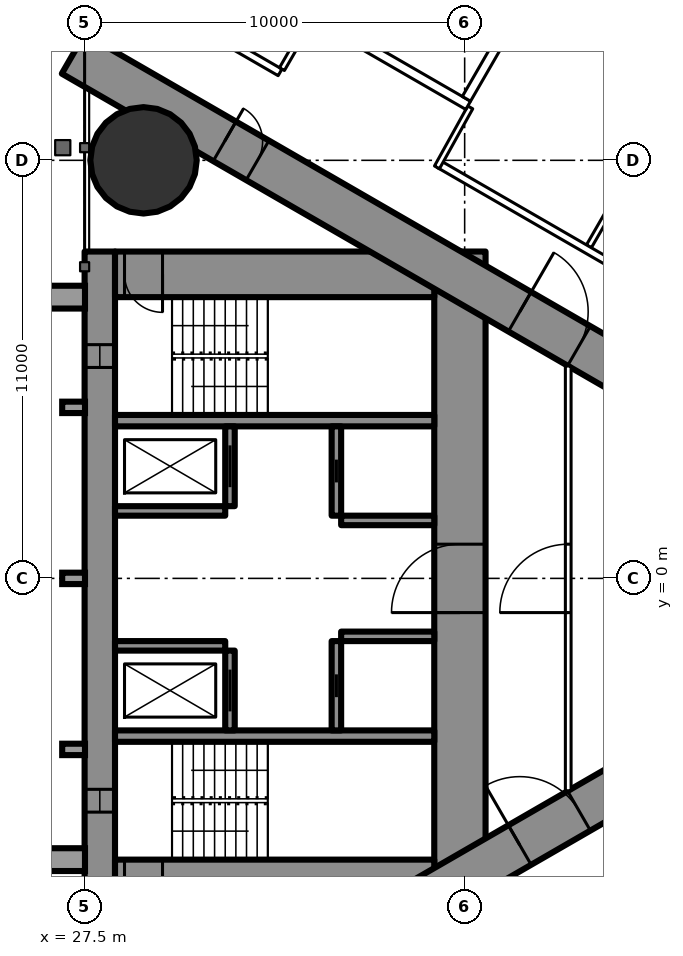
"""IFC4 building model, lengths in metres.
Left out: names, types, materials, properties, quantities, classifications, styles, units other than length and angle.
Written with IfcOpenShell. Run it as: python <this file> out.ifc"""

import sys

from ifc_helpers import new_model, si_unit, direction, frame, frame_2d, origin, origin_2d, place, context, subcontext, project, spatial, rectangle, circle, extrude, element, fill, save


model = new_model("IFC4")
c1 = context("Model", 3, precision=1e-05, world=origin(), true_north=direction((0.0, 1.0)))
c2 = subcontext(c1, "Body", "Model", "MODEL_VIEW")
j1 = project(units=[si_unit("LENGTHUNIT", "METRE"), si_unit("PLANEANGLEUNIT", "RADIAN")], contexts=[c1])
p1 = place(None, origin())
s1 = spatial("IfcSite", under=j1, at=p1, CompositionType="ELEMENT")
p2 = place(p1, origin())
s2 = spatial("IfcBuilding", under=s1, at=p2, CompositionType="ELEMENT")
p3 = place(p2, frame((0.0, 0.0, 152.7)))
s3 = spatial("IfcBuildingStorey", under=s2, at=p3, CompositionType="ELEMENT", Elevation=152.7)
p4 = place(p3, frame((29.05, 11.0, 0.0), z_axis=(0.0, 0.0, 1.0), x_axis=(1.0, 0.0, 0.0)))
e1 = element("IfcColumn", 1, at=p4, inside=s3, PredefinedType="COLUMN", context=c2, shape_type="SweptSolid", body=[
    extrude(circle(Radius=1.4, at=origin_2d()), origin(), (0.0, 0.0, 1.0), 3.6),
])
p5 = place(p3, frame((27.9, -8.6, 0.0), z_axis=(0.0, 0.0, 1.0), x_axis=(0.0, 1.0, 0.0)))
e2 = element("IfcWall", 2, at=p5, inside=s3, PredefinedType="SHEAR", context=c2, shape_type="SweptSolid", body=[
    extrude(rectangle(XDim=17.2, YDim=0.8, at=frame_2d((8.6, 0.0))), origin(), (0.0, 0.0, 1.0), 3.6),
])
p6 = place(p5, frame((2.45, 0.0, 0.6)))
e3 = element("IfcOpeningElement", 3, at=p6, cuts=e2, PredefinedType="OPENING", context=c2, shape_type="SweptSolid", body=[
    extrude(rectangle(XDim=0.6, YDim=2.1, at=frame_2d((0.3, 1.05))), frame((0.0, 0.41, 0.0), z_axis=(0.0, -1.0, 0.0), x_axis=(1.0, 0.0, 0.0)), (0.0, 0.0, 1.0), 0.82),
])
p7 = place(p5, frame((14.15, 0.0, 0.6)))
e4 = element("IfcOpeningElement", 4, at=p7, cuts=e2, PredefinedType="OPENING", context=c2, shape_type="SweptSolid", body=[
    extrude(rectangle(XDim=0.6, YDim=2.1, at=frame_2d((0.3, 1.05))), frame((0.0, 0.41, 0.0), z_axis=(0.0, -1.0, 0.0), x_axis=(1.0, 0.0, 0.0)), (0.0, 0.0, 1.0), 0.82),
])
p8 = place(p3, frame((37.375, -8.6, 0.0), z_axis=(0.0, 0.0, 1.0), x_axis=(0.0, 1.0, 0.0)))
e5 = element("IfcWall", 5, at=p8, inside=s3, PredefinedType="SHEAR", context=c2, shape_type="SweptSolid", body=[
    extrude(rectangle(XDim=17.2, YDim=1.35, at=frame_2d((8.6, 0.0))), origin(), (0.0, 0.0, 1.0), 3.6),
])
p9 = place(p8, frame((7.7, 0.0, 0.0)))
e6 = element("IfcOpeningElement", 6, at=p9, cuts=e5, PredefinedType="OPENING", context=c2, shape_type="SweptSolid", body=[
    extrude(rectangle(XDim=1.8, YDim=2.2, at=frame_2d((0.9, 1.1))), frame((0.0, 0.685, 0.0), z_axis=(0.0, -1.0, 0.0), x_axis=(1.0, 0.0, 0.0)), (0.0, 0.0, 1.0), 1.37),
])
p10 = place(p3, frame((28.3, -8.0, 0.0), z_axis=(0.0, 0.0, 1.0), x_axis=(1.0, 0.0, 0.0)))
e7 = element("IfcWall", 7, at=p10, inside=s3, PredefinedType="SHEAR", context=c2, shape_type="SweptSolid", body=[
    extrude(rectangle(XDim=8.4, YDim=1.2, at=frame_2d((4.2, 0.0))), origin(), (0.0, 0.0, 1.0), 3.6),
])
p11 = place(p10, frame((0.25, 0.0, 0.0)))
e8 = element("IfcOpeningElement", 8, at=p11, cuts=e7, PredefinedType="OPENING", context=c2, shape_type="SweptSolid", body=[
    extrude(rectangle(XDim=1.0, YDim=2.2, at=frame_2d((0.5, 1.1))), frame((0.0, 0.61, 0.0), z_axis=(0.0, -1.0, 0.0), x_axis=(1.0, 0.0, 0.0)), (0.0, 0.0, 1.0), 1.22),
])
p12 = place(p3, frame((28.3, 8.0, 0.0), z_axis=(0.0, 0.0, 1.0), x_axis=(1.0, 0.0, 0.0)))
e9 = element("IfcWall", 9, at=p12, inside=s3, PredefinedType="SHEAR", context=c2, shape_type="SweptSolid", body=[
    extrude(rectangle(XDim=8.4, YDim=1.2, at=frame_2d((4.2, 0.0))), origin(), (0.0, 0.0, 1.0), 3.6),
])
p13 = place(p12, frame((0.25, 0.0, 0.0)))
e10 = element("IfcOpeningElement", 10, at=p13, cuts=e9, PredefinedType="OPENING", context=c2, shape_type="SweptSolid", body=[
    extrude(rectangle(XDim=1.0, YDim=2.2, at=frame_2d((0.5, 1.1))), frame((0.0, 0.61, 0.0), z_axis=(0.0, -1.0, 0.0), x_axis=(1.0, 0.0, 0.0)), (0.0, 0.0, 1.0), 1.22),
])
for number, where, z_axis, x_axis in (
    (11, (28.3, -4.15, 0.0), (0.0, 0.0, 1.0), (1.0, 0.0, 0.0)),
    (12, (28.3, 4.15, 0.0), (0.0, 0.0, 1.0), (1.0, 0.0, 0.0)),
):
    element("IfcWall", number, at=place(p3, frame(where, z_axis=z_axis, x_axis=x_axis)), inside=s3, PredefinedType="SHEAR", context=c2, shape_type="SweptSolid", body=[
        extrude(rectangle(XDim=8.4, YDim=0.3, at=frame_2d((4.2, 0.0))), origin(), (0.0, 0.0, 1.0), 3.6),
    ])
p14 = place(p3, frame((31.325, -4.0, 0.0), z_axis=(0.0, 0.0, 1.0), x_axis=(0.0, 1.0, 0.0)))
e13 = element("IfcWall", 13, at=p14, inside=s3, PredefinedType="SHEAR", context=c2, shape_type="SweptSolid", body=[
    extrude(rectangle(XDim=2.1, YDim=0.25, at=frame_2d((1.05, 0.0))), origin(), (0.0, 0.0, 1.0), 3.6),
])
p15 = place(p14, frame((0.5, 0.0, 0.0)))
e14 = element("IfcOpeningElement", 14, at=p15, cuts=e13, PredefinedType="OPENING", context=c2, shape_type="SweptSolid", body=[
    extrude(rectangle(XDim=1.1, YDim=2.2, at=frame_2d((0.55, 1.1))), frame((0.0, 0.135, 0.0), z_axis=(0.0, -1.0, 0.0), x_axis=(1.0, 0.0, 0.0)), (0.0, 0.0, 1.0), 0.27),
])
p16 = place(p3, frame((34.125, -4.0, 0.0), z_axis=(0.0, 0.0, 1.0), x_axis=(0.0, 1.0, 0.0)))
e15 = element("IfcWall", 15, at=p16, inside=s3, PredefinedType="SHEAR", context=c2, shape_type="SweptSolid", body=[
    extrude(rectangle(XDim=2.35, YDim=0.25, at=frame_2d((1.175, 0.0))), origin(), (0.0, 0.0, 1.0), 3.6),
])
p17 = place(p16, frame((0.875, 0.0, 0.0)))
e16 = element("IfcOpeningElement", 16, at=p17, cuts=e15, PredefinedType="OPENING", context=c2, shape_type="SweptSolid", body=[
    extrude(rectangle(XDim=0.6, YDim=2.0, at=frame_2d((0.3, 1.0))), frame((0.0, 0.135, 0.0), z_axis=(0.0, -1.0, 0.0), x_axis=(1.0, 0.0, 0.0)), (0.0, 0.0, 1.0), 0.27),
])
p18 = place(p3, frame((28.3, -1.775, 0.0), z_axis=(0.0, 0.0, 1.0), x_axis=(1.0, 0.0, 0.0)))
e17 = element("IfcWall", 17, at=p18, inside=s3, PredefinedType="SHEAR", context=c2, shape_type="SweptSolid", body=[
    extrude(rectangle(XDim=2.9, YDim=0.25, at=frame_2d((1.45, 0.0))), origin(), (0.0, 0.0, 1.0), 3.6),
])
p19 = place(p3, frame((34.25, -1.525, 0.0), z_axis=(0.0, 0.0, 1.0), x_axis=(1.0, 0.0, 0.0)))
e18 = element("IfcWall", 18, at=p19, inside=s3, PredefinedType="SHEAR", context=c2, shape_type="SweptSolid", body=[
    extrude(rectangle(XDim=2.45, YDim=0.25, at=frame_2d((1.225, 0.0))), origin(), (0.0, 0.0, 1.0), 3.6),
])
p20 = place(p3, frame((31.325, 1.9, 0.0), z_axis=(0.0, 0.0, 1.0), x_axis=(0.0, 1.0, 0.0)))
e19 = element("IfcWall", 19, at=p20, inside=s3, PredefinedType="SHEAR", context=c2, shape_type="SweptSolid", body=[
    extrude(rectangle(XDim=2.1, YDim=0.25, at=frame_2d((1.05, 0.0))), origin(), (0.0, 0.0, 1.0), 3.6),
])
p21 = place(p20, frame((0.5, 0.0, 0.0)))
e20 = element("IfcOpeningElement", 20, at=p21, cuts=e19, PredefinedType="OPENING", context=c2, shape_type="SweptSolid", body=[
    extrude(rectangle(XDim=1.1, YDim=2.2, at=frame_2d((0.55, 1.1))), frame((0.0, 0.135, 0.0), z_axis=(0.0, -1.0, 0.0), x_axis=(1.0, 0.0, 0.0)), (0.0, 0.0, 1.0), 0.27),
])
p22 = place(p3, frame((34.125, 1.65, 0.0), z_axis=(0.0, 0.0, 1.0), x_axis=(0.0, 1.0, 0.0)))
e21 = element("IfcWall", 21, at=p22, inside=s3, PredefinedType="SHEAR", context=c2, shape_type="SweptSolid", body=[
    extrude(rectangle(XDim=2.35, YDim=0.25, at=frame_2d((1.175, 0.0))), origin(), (0.0, 0.0, 1.0), 3.6),
])
p23 = place(p22, frame((0.875, 0.0, 0.0)))
e22 = element("IfcOpeningElement", 22, at=p23, cuts=e21, PredefinedType="OPENING", context=c2, shape_type="SweptSolid", body=[
    extrude(rectangle(XDim=0.6, YDim=2.0, at=frame_2d((0.3, 1.0))), frame((0.0, 0.135, 0.0), z_axis=(0.0, -1.0, 0.0), x_axis=(1.0, 0.0, 0.0)), (0.0, 0.0, 1.0), 0.27),
])
p24 = place(p3, frame((28.3, 1.775, 0.0), z_axis=(0.0, 0.0, 1.0), x_axis=(1.0, 0.0, 0.0)))
e23 = element("IfcWall", 23, at=p24, inside=s3, PredefinedType="SHEAR", context=c2, shape_type="SweptSolid", body=[
    extrude(rectangle(XDim=2.9, YDim=0.25, at=frame_2d((1.45, 0.0))), origin(), (0.0, 0.0, 1.0), 3.6),
])
p25 = place(p3, frame((34.25, 1.525, 0.0), z_axis=(0.0, 0.0, 1.0), x_axis=(1.0, 0.0, 0.0)))
e24 = element("IfcWall", 24, at=p25, inside=s3, PredefinedType="SHEAR", context=c2, shape_type="SweptSolid", body=[
    extrude(rectangle(XDim=2.45, YDim=0.25, at=frame_2d((1.225, 0.0))), origin(), (0.0, 0.0, 1.0), 3.6),
])
p26 = place(p3, frame((27.2, -13.8, 0.0), z_axis=(0.0, 0.0, 1.0), x_axis=(0.866027159892, 0.499996958321, 0.0)))
e25 = element("IfcWall", 25, at=p26, inside=s3, PredefinedType="SHEAR", context=c2, shape_type="SweptSolid", body=[
    extrude(rectangle(XDim=27.947, YDim=1.2, at=frame_2d((13.973, 0.0))), origin(), (0.0, 0.0, 1.0), 3.6),
])
p27 = place(p26, frame((4.6, 0.0, 0.0)))
e26 = element("IfcOpeningElement", 26, at=p27, cuts=e25, PredefinedType="OPENING", context=c2, shape_type="SweptSolid", body=[
    extrude(rectangle(XDim=1.0, YDim=2.2, at=frame_2d((0.5, 1.1))), frame((0.0, 0.61, 0.0), z_axis=(0.0, -1.0, 0.0), x_axis=(1.0, 0.0, 0.0)), (0.0, 0.0, 1.0), 1.22),
])
p28 = place(p26, frame((13.568, 0.0, 0.0)))
e27 = element("IfcOpeningElement", 27, at=p28, cuts=e25, PredefinedType="OPENING", context=c2, shape_type="SweptSolid", body=[
    extrude(rectangle(XDim=1.8, YDim=2.04, at=frame_2d((0.9, 1.02))), frame((0.0, 0.61, 0.0), z_axis=(0.0, -1.0, 0.0), x_axis=(1.0, 0.0, 0.0)), (0.0, 0.0, 1.0), 1.22),
])
p29 = place(p3, frame((27.2, 13.8, 0.0), z_axis=(0.0, 0.0, 1.0), x_axis=(0.866024515034, -0.500001539357, 0.0)))
e28 = element("IfcWall", 28, at=p29, inside=s3, PredefinedType="SHEAR", context=c2, shape_type="SweptSolid", body=[
    extrude(rectangle(XDim=26.907, YDim=1.2, at=frame_2d((13.454, 0.0))), origin(), (0.0, 0.0, 1.0), 3.6),
])
p30 = place(p29, frame((4.6, 0.0, 0.0)))
e29 = element("IfcOpeningElement", 29, at=p30, cuts=e28, PredefinedType="OPENING", context=c2, shape_type="SweptSolid", body=[
    extrude(rectangle(XDim=1.0, YDim=2.2, at=frame_2d((0.5, 1.1))), frame((0.0, 0.61, 0.0), z_axis=(0.0, -1.0, 0.0), x_axis=(1.0, 0.0, 0.0)), (0.0, 0.0, 1.0), 1.22),
])
p31 = place(p29, frame((13.568, 0.0, 0.0)))
e30 = element("IfcOpeningElement", 30, at=p31, cuts=e28, PredefinedType="OPENING", context=c2, shape_type="SweptSolid", body=[
    extrude(rectangle(XDim=1.8, YDim=2.04, at=frame_2d((0.9, 1.02))), frame((0.0, 0.61, 0.0), z_axis=(0.0, -1.0, 0.0), x_axis=(1.0, 0.0, 0.0)), (0.0, 0.0, 1.0), 1.22),
])
p32 = place(p3, frame((40.769, 8.737, 0.0), z_axis=(0.0, 0.0, 1.0), x_axis=(0.500013115284, 0.866017831539, 0.0)))
e31 = element("IfcWall", 31, at=p32, inside=s3, PredefinedType="PARTITIONING", context=c2, shape_type="SweptSolid", body=[
    extrude(rectangle(XDim=7.198, YDim=0.15, at=frame_2d((3.599, 0.0))), origin(), (0.0, 0.0, 1.0), 2.4),
])
p33 = place(p3, frame((27.903, 16.05, 0.0), z_axis=(0.0, 0.0, 1.0), x_axis=(0.866019186459, -0.50001076857, 0.0)))
e32 = element("IfcWall", 32, at=p33, inside=s3, PredefinedType="PARTITIONING", context=c2, shape_type="SweptSolid", body=[
    extrude(rectangle(XDim=5.473, YDim=0.2, at=frame_2d((2.737, 0.0))), origin(), (0.0, 0.0, 1.0), 3.35),
])
p34 = place(p33, frame((1.836, 0.0, 0.0)))
e33 = element("IfcOpeningElement", 33, at=p34, cuts=e32, PredefinedType="OPENING", context=c2, shape_type="SweptSolid", body=[
    extrude(rectangle(XDim=1.8, YDim=2.2, at=frame_2d((0.9, 1.1))), frame((0.0, 0.11, 0.0), z_axis=(0.0, -1.0, 0.0), x_axis=(1.0, 0.0, 0.0)), (0.0, 0.0, 1.0), 0.22),
])
p35 = place(p3, frame((36.834, 10.894, 0.0), z_axis=(0.0, 0.0, 1.0), x_axis=(0.866031655879, -0.499989170898, 0.0)))
e34 = element("IfcWall", 34, at=p35, inside=s3, PredefinedType="PARTITIONING", context=c2, shape_type="SweptSolid", body=[
    extrude(rectangle(XDim=11.41, YDim=0.2, at=frame_2d((5.705, 0.0))), origin(), (0.0, 0.0, 1.0), 3.35),
])
p36 = place(p35, frame((5.323, 0.0, 0.0)))
e35 = element("IfcOpeningElement", 35, at=p36, cuts=e34, PredefinedType="OPENING", context=c2, shape_type="SweptSolid", body=[
    extrude(rectangle(XDim=1.8, YDim=2.04, at=frame_2d((0.9, 1.02))), frame((0.0, 0.11, 0.0), z_axis=(0.0, -1.0, 0.0), x_axis=(1.0, 0.0, 0.0)), (0.0, 0.0, 1.0), 0.22),
])
p37 = place(p3, frame((36.771, 10.814, 0.0), z_axis=(0.0, 0.0, 1.0), x_axis=(0.485585508183, 0.874189175317, 0.0)))
e36 = element("IfcWall", 36, at=p37, inside=s3, PredefinedType="PARTITIONING", context=c2, shape_type="SweptSolid", body=[
    extrude(rectangle(XDim=1.805, YDim=0.15, at=frame_2d((0.902, 0.0))), origin(), (0.0, 0.0, 1.0), 3.35),
])
p38 = place(p3, frame((32.692, 13.4, 0.0), z_axis=(0.0, 0.0, 1.0), x_axis=(0.499985008713, 0.866034058835, 0.0)))
e37 = element("IfcWall", 37, at=p38, inside=s3, PredefinedType="PARTITIONING", context=c2, shape_type="SweptSolid", body=[
    extrude(rectangle(XDim=1.529, YDim=0.15, at=frame_2d((0.765, 0.0))), origin(), (0.0, 0.0, 1.0), 3.35),
])
p39 = place(p3, frame((27.903, -16.05, 0.0), z_axis=(0.0, 0.0, 1.0), x_axis=(0.86602417537, 0.500002127671, 0.0)))
e38 = element("IfcWall", 38, at=p39, inside=s3, PredefinedType="PARTITIONING", context=c2, shape_type="SweptSolid", body=[
    extrude(rectangle(XDim=24.307, YDim=0.2, at=frame_2d((12.153, 0.0))), origin(), (0.0, 0.0, 1.0), 3.35),
])
p40 = place(p39, frame((4.162, 0.0, 0.0)))
e39 = element("IfcOpeningElement", 39, at=p40, cuts=e38, PredefinedType="OPENING", context=c2, shape_type="SweptSolid", body=[
    extrude(rectangle(XDim=2.0, YDim=2.4, at=frame_2d((1.0, 1.2))), frame((0.0, 0.11, 0.0), z_axis=(0.0, -1.0, 0.0), x_axis=(1.0, 0.0, 0.0)), (0.0, 0.0, 1.0), 0.22),
])
p41 = place(p39, frame((17.678, 0.0, 0.0)))
e40 = element("IfcOpeningElement", 40, at=p41, cuts=e38, PredefinedType="OPENING", context=c2, shape_type="SweptSolid", body=[
    extrude(rectangle(XDim=2.0, YDim=2.4, at=frame_2d((1.0, 1.2))), frame((0.0, 0.11, 0.0), z_axis=(0.0, -1.0, 0.0), x_axis=(1.0, 0.0, 0.0)), (0.0, 0.0, 1.0), 0.22),
])
p42 = place(p3, frame((40.225, -5.587, 0.0), z_axis=(0.0, 0.0, 1.0), x_axis=(0.0, 1.0, 0.0)))
e41 = element("IfcWall", 41, at=p42, inside=s3, PredefinedType="PARTITIONING", context=c2, shape_type="SweptSolid", body=[
    extrude(rectangle(XDim=11.174, YDim=0.15, at=frame_2d((5.587, 0.0))), origin(), (0.0, 0.0, 1.0), 3.35),
])
p43 = place(p42, frame((4.687, 0.0, 0.0)))
e42 = element("IfcOpeningElement", 42, at=p43, cuts=e41, PredefinedType="OPENING", context=c2, shape_type="SweptSolid", body=[
    extrude(rectangle(XDim=1.8, YDim=2.2, at=frame_2d((0.9, 1.1))), frame((0.0, 0.085, 0.0), z_axis=(0.0, -1.0, 0.0), x_axis=(1.0, 0.0, 0.0)), (0.0, 0.0, 1.0), 0.17),
])
p44 = place(p3, frame((33.608, 14.747, 0.0), z_axis=(0.0, 0.0, 1.0), x_axis=(0.866043305498, -0.49996899204, 0.0)))
e43 = element("IfcWall", 43, at=p44, inside=s3, PredefinedType="PARTITIONING", context=c2, shape_type="SweptSolid", body=[
    extrude(rectangle(XDim=4.6, YDim=0.25, at=frame_2d((2.3, 0.0))), origin(), (0.0, 0.0, 1.0), 3.35),
])
p45 = place(p3, frame((37.547, 12.618, 0.0), z_axis=(0.0, 0.0, 1.0), x_axis=(0.499929347863, 0.866066190972, 0.0)))
e44 = element("IfcWall", 44, at=p45, inside=s3, PredefinedType="PARTITIONING", context=c2, shape_type="SweptSolid", body=[
    extrude(rectangle(XDim=3.201, YDim=0.25, at=frame_2d((1.6, 0.0))), origin(), (0.0, 0.0, 1.0), 3.35),
])
p46 = place(p43, origin())
e45 = element("IfcDoor", 45, at=p46, inside=s3, OperationType="DOUBLE_DOOR_SINGLE_SWING", PredefinedType="DOOR", context=c2, shape_type="SweptSolid", body=[
    extrude(rectangle(XDim=1.8, YDim=2.2, at=frame_2d((0.9, 1.1))), frame((0.0, 0.025, 0.0), z_axis=(0.0, -1.0, 0.0), x_axis=(1.0, 0.0, 0.0)), (0.0, 0.0, 1.0), 0.05),
])
fill(e42, e45)
p47 = place(p28, origin())
e46 = element("IfcDoor", 46, at=p47, inside=s3, OperationType="DOUBLE_DOOR_SINGLE_SWING", PredefinedType="DOOR", context=c2, shape_type="SweptSolid", body=[
    extrude(rectangle(XDim=1.8, YDim=2.04, at=frame_2d((0.9, 1.02))), frame((0.0, 0.025, 0.0), z_axis=(0.0, -1.0, 0.0), x_axis=(1.0, 0.0, 0.0)), (0.0, 0.0, 1.0), 0.05),
])
fill(e27, e46)
p48 = place(p30, origin())
e47 = element("IfcDoor", 47, at=p48, inside=s3, OperationType="SINGLE_SWING_LEFT", PredefinedType="DOOR", context=c2, shape_type="SweptSolid", body=[
    extrude(rectangle(XDim=1.0, YDim=2.2, at=frame_2d((0.5, 1.1))), frame((0.0, 0.025, 0.0), z_axis=(0.0, -1.0, 0.0), x_axis=(1.0, 0.0, 0.0)), (0.0, 0.0, 1.0), 0.05),
])
fill(e29, e47)
p49 = place(p31, origin())
e48 = element("IfcDoor", 48, at=p49, inside=s3, OperationType="DOUBLE_DOOR_SINGLE_SWING", PredefinedType="DOOR", context=c2, shape_type="SweptSolid", body=[
    extrude(rectangle(XDim=1.8, YDim=2.04, at=frame_2d((0.9, 1.02))), frame((0.0, 0.025, 0.0), z_axis=(0.0, -1.0, 0.0), x_axis=(1.0, 0.0, 0.0)), (0.0, 0.0, 1.0), 0.05),
])
fill(e30, e48)
p50 = place(p9, origin())
e49 = element("IfcDoor", 49, at=p50, inside=s3, OperationType="DOUBLE_DOOR_SINGLE_SWING", PredefinedType="DOOR", context=c2, shape_type="SweptSolid", body=[
    extrude(rectangle(XDim=1.8, YDim=2.2, at=frame_2d((0.9, 1.1))), frame((0.0, 0.025, 0.0), z_axis=(0.0, -1.0, 0.0), x_axis=(1.0, 0.0, 0.0)), (0.0, 0.0, 1.0), 0.05),
])
fill(e6, e49)
p51 = place(p13, origin())
e50 = element("IfcDoor", 50, at=p51, inside=s3, OperationType="SINGLE_SWING_RIGHT", PredefinedType="DOOR", context=c2, shape_type="SweptSolid", body=[
    extrude(rectangle(XDim=1.0, YDim=2.2, at=frame_2d((0.5, 1.1))), frame((0.0, 0.025, 0.0), z_axis=(0.0, -1.0, 0.0), x_axis=(1.0, 0.0, 0.0)), (0.0, 0.0, 1.0), 0.05),
])
fill(e10, e50)
p52 = place(p15, origin())
e51 = element("IfcDoor", 51, at=p52, inside=s3, OperationType="SLIDING_TO_LEFT", PredefinedType="USERDEFINED", context=c2, shape_type="SweptSolid", body=[
    extrude(rectangle(XDim=1.1, YDim=2.2, at=frame_2d((0.55, 1.1))), frame((0.0, 0.025, 0.0), z_axis=(0.0, -1.0, 0.0), x_axis=(1.0, 0.0, 0.0)), (0.0, 0.0, 1.0), 0.05),
])
fill(e14, e51)
p53 = place(p21, origin())
e52 = element("IfcDoor", 52, at=p53, inside=s3, OperationType="SLIDING_TO_LEFT", PredefinedType="USERDEFINED", context=c2, shape_type="SweptSolid", body=[
    extrude(rectangle(XDim=1.1, YDim=2.2, at=frame_2d((0.55, 1.1))), frame((0.0, 0.025, 0.0), z_axis=(0.0, -1.0, 0.0), x_axis=(1.0, 0.0, 0.0)), (0.0, 0.0, 1.0), 0.05),
])
fill(e20, e52)
p54 = place(p17, origin())
e53 = element("IfcDoor", 53, at=p54, inside=s3, OperationType="SLIDING_TO_LEFT", PredefinedType="DOOR", context=c2, shape_type="SweptSolid", body=[
    extrude(rectangle(XDim=0.6, YDim=2.0, at=frame_2d((0.3, 1.0))), frame((0.0, 0.025, 0.0), z_axis=(0.0, -1.0, 0.0), x_axis=(1.0, 0.0, 0.0)), (0.0, 0.0, 1.0), 0.05),
])
fill(e16, e53)
p55 = place(p23, origin())
e54 = element("IfcDoor", 54, at=p55, inside=s3, OperationType="SLIDING_TO_LEFT", PredefinedType="DOOR", context=c2, shape_type="SweptSolid", body=[
    extrude(rectangle(XDim=0.6, YDim=2.0, at=frame_2d((0.3, 1.0))), frame((0.0, 0.025, 0.0), z_axis=(0.0, -1.0, 0.0), x_axis=(1.0, 0.0, 0.0)), (0.0, 0.0, 1.0), 0.05),
])
fill(e22, e54)
p56 = place(p6, origin())
e55 = element("IfcWindow", 55, at=p56, inside=s3, PartitioningType="SINGLE_PANEL", PredefinedType="WINDOW", context=c2, shape_type="SweptSolid", body=[
    extrude(rectangle(XDim=0.6, YDim=2.1, at=frame_2d((0.3, 1.05))), frame((0.0, 0.03, 0.0), z_axis=(0.0, -1.0, 0.0), x_axis=(1.0, 0.0, 0.0)), (0.0, 0.0, 1.0), 0.06),
])
fill(e3, e55)
p57 = place(p7, origin())
e56 = element("IfcWindow", 56, at=p57, inside=s3, PartitioningType="SINGLE_PANEL", PredefinedType="WINDOW", context=c2, shape_type="SweptSolid", body=[
    extrude(rectangle(XDim=0.6, YDim=2.1, at=frame_2d((0.3, 1.05))), frame((0.0, 0.03, 0.0), z_axis=(0.0, -1.0, 0.0), x_axis=(1.0, 0.0, 0.0)), (0.0, 0.0, 1.0), 0.06),
])
fill(e4, e56)
save(model, sys.argv[1])
